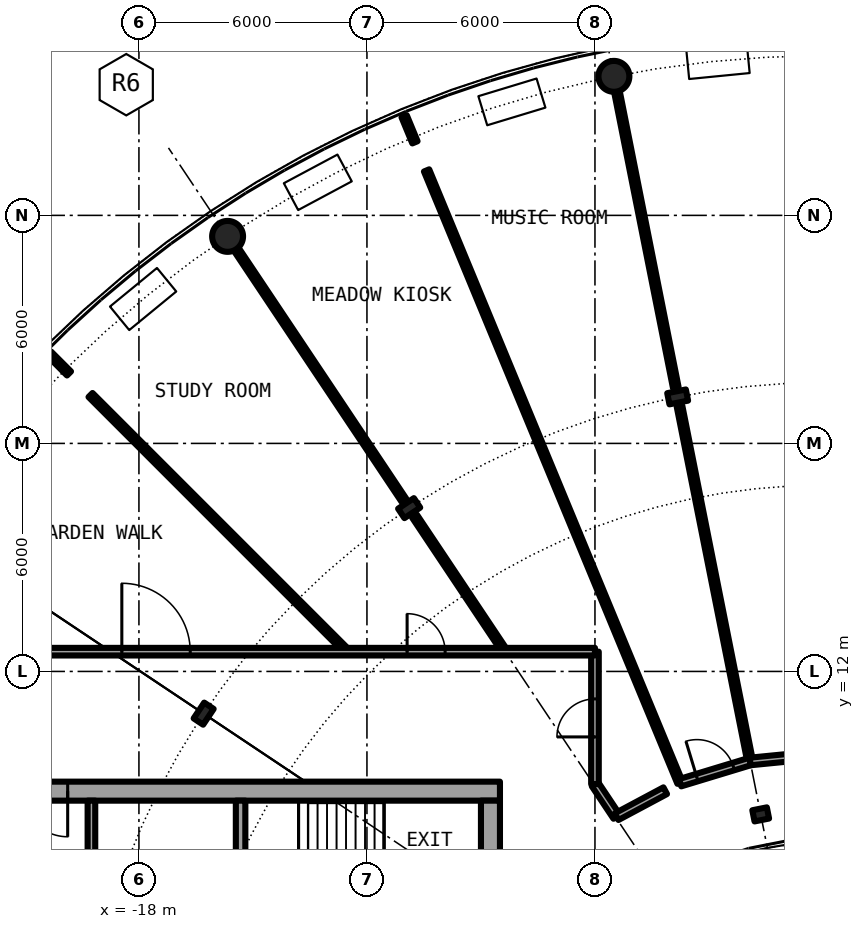
"""IFC4 building model, lengths in metres.
Left out: names, types, materials, properties, quantities, classifications, styles, units other than length and angle.
Written with IfcOpenShell. Run it as: python <this file> out.ifc"""

import sys

from ifc_helpers import new_model, si_unit, direction, frame, frame_2d, origin, origin_2d, place, context, subcontext, project, spatial, rectangle, hollow_circle, i_section, extrude, element, fill, save


model = new_model("IFC4")
c1 = context("Model", 3, precision=1e-05, world=origin(), true_north=direction((0.0, 1.0)))
c2 = subcontext(c1, "Body", "Model", "MODEL_VIEW")
j1 = project(units=[si_unit("LENGTHUNIT", "METRE"), si_unit("PLANEANGLEUNIT", "RADIAN")], contexts=[c1])
p1 = place(None, origin())
s1 = spatial("IfcSite", under=j1, at=p1, CompositionType="ELEMENT")
p2 = place(p1, origin())
s2 = spatial("IfcBuilding", under=s1, at=p2, CompositionType="ELEMENT")
p3 = place(p2, frame((0.0, 0.0, 179.9)))
s3 = spatial("IfcBuildingStorey", under=s2, at=p3, CompositionType="ELEMENT", Elevation=179.9)
for number, where, z_axis, x_axis in (
    (1, (-5.501, 27.658, 0.0), (0.0, 0.0, 1.0), (1.0, 0.0, 0.0)),
    (2, (-15.667, 23.448, 0.0), (0.0, 0.0, 1.0), (1.0, 0.0, 0.0)),
):
    element("IfcColumn", number, at=place(p3, frame(where, z_axis=z_axis, x_axis=x_axis)), inside=s3, PredefinedType="COLUMN", context=c2, shape_type="SweptSolid", body=[
        extrude(hollow_circle(Radius=0.406, WallThickness=0.04, at=origin_2d()), origin(), (0.0, 0.0, 1.0), 6.1),
    ])
for number, where, z_axis, x_axis in (
    (3, (-3.824, 19.223, 0.0), (0.0, 0.0, 1.0), (-0.195, 0.981, 0.0)),
    (4, (-10.889, 16.297, 0.0), (0.0, 0.0, 1.0), (-0.556, 0.831, 0.0)),
    (5, (-16.297, 10.889, 0.0), (0.0, 0.0, 1.0), (-0.831, 0.556, 0.0)),
):
    element("IfcColumn", number, at=place(p3, frame(where, z_axis=z_axis, x_axis=x_axis)), inside=s3, PredefinedType="COLUMN", context=c2, shape_type="SweptSolid", body=[
        extrude(i_section(OverallWidth=0.3, OverallDepth=0.5, WebThickness=0.014, FlangeThickness=0.028, FilletRadius=0.027, at=origin_2d()), origin(), (0.0, 0.0, 1.0), 6.1),
    ])
p4 = place(p3, frame((-1.639, 8.239, 0.0), z_axis=(0.0, 0.0, 1.0), x_axis=(-0.195090322016, 0.980785280403, 0.0)))
e6 = element("IfcColumn", 6, at=p4, inside=s3, PredefinedType="COLUMN", context=c2, shape_type="SweptSolid", body=[
    extrude(i_section(OverallWidth=0.3, OverallDepth=0.39, WebThickness=0.011, FlangeThickness=0.019, FilletRadius=0.027, at=origin_2d()), origin(), (0.0, 0.0, 1.0), 6.1),
])
p5 = place(p3, frame((-8.5, 8.85, 0.0), z_axis=(0.0, 0.0, 1.0), x_axis=(-1.0, 0.0, 0.0)))
e7 = element("IfcWall", 7, at=p5, inside=s3, PredefinedType="SHEAR", context=c2, shape_type="SweptSolid", body=[
    extrude(rectangle(XDim=13.6, YDim=0.5, at=frame_2d((6.8, 0.0))), origin(), (0.0, 0.0, 1.0), 6.1),
])
p6 = place(p5, frame((11.375, 0.0, 0.0)))
e8 = element("IfcOpeningElement", 8, at=p6, cuts=e7, PredefinedType="OPENING", context=c2, shape_type="SweptSolid", body=[
    extrude(rectangle(XDim=1.2, YDim=2.3, at=frame_2d((0.6, 1.15))), frame((0.0, 0.26, 0.0), z_axis=(0.0, -1.0, 0.0), x_axis=(1.0, 0.0, 0.0)), (0.0, 0.0, 1.0), 0.52),
])
p7 = place(p3, frame((-8.75, 8.6, 0.0), z_axis=(0.0, 0.0, 1.0), x_axis=(0.0, -1.0, 0.0)))
e9 = element("IfcWall", 9, at=p7, inside=s3, PredefinedType="SHEAR", context=c2, shape_type="SweptSolid", body=[
    extrude(rectangle(XDim=17.2, YDim=0.5, at=frame_2d((8.6, 0.0))), origin(), (0.0, 0.0, 1.0), 6.1),
])
p8 = place(p7, frame((7.4, 0.0, 0.1)))
e10 = element("IfcOpeningElement", 10, at=p8, cuts=e9, PredefinedType="OPENING", context=c2, shape_type="SweptSolid", body=[
    extrude(rectangle(XDim=2.4, YDim=2.2, at=frame_2d((1.2, 1.1))), frame((0.0, 0.26, 0.0), z_axis=(0.0, -1.0, 0.0), x_axis=(1.0, 0.0, 0.0)), (0.0, 0.0, 1.0), 0.52),
])
p9 = place(p3, frame((-15.325, 8.6, 0.0), z_axis=(0.0, 0.0, 1.0), x_axis=(0.0, -1.0, 0.0)))
e11 = element("IfcWall", 11, at=p9, inside=s3, PredefinedType="SHEAR", context=c2, shape_type="SweptSolid", body=[
    extrude(rectangle(XDim=3.95, YDim=0.25, at=frame_2d((1.975, 0.0))), origin(), (0.0, 0.0, 1.0), 6.1),
])
p10 = place(p9, frame((2.025, 0.0, 0.0)))
e12 = element("IfcOpeningElement", 12, at=p10, cuts=e11, PredefinedType="OPENING", context=c2, shape_type="SweptSolid", body=[
    extrude(rectangle(XDim=1.2, YDim=2.3, at=frame_2d((0.6, 1.15))), frame((0.0, 0.135, 0.0), z_axis=(0.0, -1.0, 0.0), x_axis=(1.0, 0.0, 0.0)), (0.0, 0.0, 1.0), 0.27),
])
p11 = place(p3, frame((-19.25, 8.6, 0.0), z_axis=(0.0, 0.0, 1.0), x_axis=(0.0, -1.0, 0.0)))
e13 = element("IfcWall", 13, at=p11, inside=s3, PredefinedType="SOLIDWALL", context=c2, shape_type="SweptSolid", body=[
    extrude(rectangle(XDim=7.025, YDim=0.2, at=frame_2d((3.513, 0.0))), origin(), (0.0, 0.0, 1.0), 5.7),
])
p12 = place(p11, frame((2.35, 0.0, 0.0)))
e14 = element("IfcOpeningElement", 14, at=p12, cuts=e13, PredefinedType="OPENING", context=c2, shape_type="SweptSolid", body=[
    extrude(rectangle(XDim=1.1, YDim=2.3, at=frame_2d((0.55, 1.15))), frame((0.0, 0.11, 0.0), z_axis=(0.0, -1.0, 0.0), x_axis=(1.0, 0.0, 0.0)), (0.0, 0.0, 1.0), 0.22),
])
p13 = place(p3, frame((-11.021, 26.608, 0.0), z_axis=(0.0, 0.0, 1.0), x_axis=(0.382535780864, -0.923940677943, 0.0)))
e15 = element("IfcWall", 15, at=p13, inside=s3, PredefinedType="PARTITIONING", context=c2, shape_type="SweptSolid", body=[
    extrude(rectangle(XDim=0.742, YDim=0.15, at=frame_2d((0.371, 0.0))), origin(), (0.0, 0.0, 1.0), 5.7),
])
p14 = place(p3, frame((-10.431, 25.183, 0.0), z_axis=(0.0, 0.0, 1.0), x_axis=(0.382491934833, -0.923958830137, 0.0)))
e16 = element("IfcWall", 16, at=p14, inside=s3, PredefinedType="PARTITIONING", context=c2, shape_type="SweptSolid", body=[
    extrude(rectangle(XDim=17.438, YDim=0.15, at=frame_2d((8.719, 0.0))), origin(), (0.0, 0.0, 1.0), 5.7),
])
p15 = place(p3, frame((-20.365, 20.365, 0.0), z_axis=(0.0, 0.0, 1.0), x_axis=(0.707106781187, -0.707106781187, 0.0)))
e17 = element("IfcWall", 17, at=p15, inside=s3, PredefinedType="PARTITIONING", context=c2, shape_type="SweptSolid", body=[
    extrude(rectangle(XDim=0.742, YDim=0.15, at=frame_2d((0.371, 0.0))), origin(), (0.0, 0.0, 1.0), 5.7),
])
p16 = place(p3, frame((-19.274, 19.274, 0.0), z_axis=(0.0, 0.0, 1.0), x_axis=(0.707106781187, -0.707106781187, 0.0)))
e18 = element("IfcWall", 18, at=p16, inside=s3, PredefinedType="PARTITIONING", context=c2, shape_type="SweptSolid", body=[
    extrude(rectangle(XDim=9.552, YDim=0.15, at=frame_2d((4.776, 0.0))), origin(), (0.0, 0.0, 1.0), 5.7),
])
p17 = place(p3, frame((-15.445, 23.116, 0.0), z_axis=(0.0, 0.0, 1.0), x_axis=(0.555536068825, -0.831492439073, 0.0)))
e19 = element("IfcWall", 19, at=p17, inside=s3, PredefinedType="PARTITIONING", context=c2, shape_type="SweptSolid", body=[
    extrude(rectangle(XDim=7.951, YDim=0.15, at=frame_2d((3.976, 0.0))), origin(), (0.0, 0.0, 1.0), 5.7),
])
p18 = place(p3, frame((-10.75, 16.089, 0.0), z_axis=(0.0, 0.0, 1.0), x_axis=(0.555448182904, -0.831551150627, 0.0)))
e20 = element("IfcWall", 20, at=p18, inside=s3, PredefinedType="PARTITIONING", context=c2, shape_type="SweptSolid", body=[
    extrude(rectangle(XDim=4.292, YDim=0.15, at=frame_2d((2.146, 0.0))), origin(), (0.0, 0.0, 1.0), 5.7),
])
p19 = place(p3, frame((-5.424, 27.267, 0.0), z_axis=(0.0, 0.0, 1.0), x_axis=(0.195076736895, -0.980787982554, 0.0)))
e21 = element("IfcWall", 21, at=p19, inside=s3, PredefinedType="PARTITIONING", context=c2, shape_type="SweptSolid", body=[
    extrude(rectangle(XDim=7.951, YDim=0.15, at=frame_2d((3.976, 0.0))), origin(), (0.0, 0.0, 1.0), 5.7),
])
p20 = place(p3, frame((-3.775, 18.978, 0.0), z_axis=(0.0, 0.0, 1.0), x_axis=(0.195056807593, -0.980791946241, 0.0)))
e22 = element("IfcWall", 22, at=p20, inside=s3, PredefinedType="PARTITIONING", context=c2, shape_type="SweptSolid", body=[
    extrude(rectangle(XDim=9.53, YDim=0.15, at=frame_2d((4.765, 0.0))), origin(), (0.0, 0.0, 1.0), 5.7),
])
p21 = place(p3, frame((-6.0, 9.034, 0.0), z_axis=(0.0, 0.0, 1.0), x_axis=(0.555412364489, -0.831575075007, 0.0)))
e23 = element("IfcWall", 23, at=p21, inside=s3, PredefinedType="PARTITIONING", context=c2, shape_type="SweptSolid", body=[
    extrude(rectangle(XDim=1.028, YDim=0.2, at=frame_2d((0.514, 0.0))), origin(), (0.0, 0.0, 1.0), 5.7),
])
p22 = place(p3, frame((-6.0, 9.034, 0.0), z_axis=(0.0, 0.0, 1.0), x_axis=(0.0, 1.0, 0.0)))
e24 = element("IfcWall", 24, at=p22, inside=s3, PredefinedType="PARTITIONING", context=c2, shape_type="SweptSolid", body=[
    extrude(rectangle(XDim=3.486, YDim=0.2, at=frame_2d((1.743, 0.0))), origin(), (0.0, 0.0, 1.0), 5.7),
])
p23 = place(p22, frame((1.243, 0.0, 0.0)))
e25 = element("IfcOpeningElement", 25, at=p23, cuts=e24, PredefinedType="OPENING", context=c2, shape_type="SweptSolid", body=[
    extrude(rectangle(XDim=1.0, YDim=2.3, at=frame_2d((0.5, 1.15))), frame((0.0, 0.11, 0.0), z_axis=(0.0, -1.0, 0.0), x_axis=(1.0, 0.0, 0.0)), (0.0, 0.0, 1.0), 0.22),
])
p24 = place(p3, frame((-5.429, 8.179, 0.0), z_axis=(0.0, 0.0, 1.0), x_axis=(0.88193287619, 0.471375011954, 0.0)))
e26 = element("IfcWall", 26, at=p24, inside=s3, PredefinedType="PARTITIONING", context=c2, shape_type="SweptSolid", body=[
    extrude(rectangle(XDim=1.449, YDim=0.2, at=frame_2d((0.725, 0.0))), origin(), (0.0, 0.0, 1.0), 5.7),
])
p25 = place(p3, frame((-3.758, 9.072, 0.0), z_axis=(0.0, 0.0, 1.0), x_axis=(0.956896312675, 0.29042976223, 0.0)))
e27 = element("IfcWall", 27, at=p25, inside=s3, PredefinedType="PARTITIONING", context=c2, shape_type="SweptSolid", body=[
    extrude(rectangle(XDim=1.925, YDim=0.2, at=frame_2d((0.962, 0.0))), origin(), (0.0, 0.0, 1.0), 5.7),
])
p26 = place(p25, frame((0.462, 0.0, 0.0)))
e28 = element("IfcOpeningElement", 28, at=p26, cuts=e27, PredefinedType="OPENING", context=c2, shape_type="SweptSolid", body=[
    extrude(rectangle(XDim=1.0, YDim=2.3, at=frame_2d((0.5, 1.15))), frame((0.0, 0.11, 0.0), z_axis=(0.0, -1.0, 0.0), x_axis=(1.0, 0.0, 0.0)), (0.0, 0.0, 1.0), 0.22),
])
p27 = place(p3, frame((-1.916, 9.631, 0.0), z_axis=(0.0, 0.0, 1.0), x_axis=(0.995171860647, 0.098147683504, 0.0)))
e29 = element("IfcWall", 29, at=p27, inside=s3, PredefinedType="PARTITIONING", context=c2, shape_type="SweptSolid", body=[
    extrude(rectangle(XDim=1.925, YDim=0.2, at=frame_2d((0.963, 0.0))), origin(), (0.0, 0.0, 1.0), 5.7),
])
p28 = place(p3, frame((-21.9, 12.52, 0.0), z_axis=(0.0, 0.0, 1.0), x_axis=(1.0, 0.0, 0.0)))
e30 = element("IfcWall", 30, at=p28, inside=s3, PredefinedType="PARTITIONING", context=c2, shape_type="SweptSolid", body=[
    extrude(rectangle(XDim=15.9, YDim=0.2, at=frame_2d((7.95, 0.0))), origin(), (0.0, 0.0, 1.0), 5.7),
])
p29 = place(p28, frame((10.957, 0.0, 0.0)))
e31 = element("IfcOpeningElement", 31, at=p29, cuts=e30, PredefinedType="OPENING", context=c2, shape_type="SweptSolid", body=[
    extrude(rectangle(XDim=1.0, YDim=2.3, at=frame_2d((0.5, 1.15))), frame((0.0, 0.11, 0.0), z_axis=(0.0, -1.0, 0.0), x_axis=(1.0, 0.0, 0.0)), (0.0, 0.0, 1.0), 0.22),
])
p30 = place(p28, frame((3.45, 0.0, 0.0)))
e32 = element("IfcOpeningElement", 32, at=p30, cuts=e30, PredefinedType="OPENING", context=c2, shape_type="SweptSolid", body=[
    extrude(rectangle(XDim=1.8, YDim=2.3, at=frame_2d((0.9, 1.15))), frame((0.0, 0.11, 0.0), z_axis=(0.0, -1.0, 0.0), x_axis=(1.0, 0.0, 0.0)), (0.0, 0.0, 1.0), 0.22),
])
p31 = place(p6, origin())
e33 = element("IfcDoor", 33, at=p31, inside=s3, OperationType="SINGLE_SWING_LEFT", PredefinedType="DOOR", context=c2, shape_type="SweptSolid", body=[
    extrude(rectangle(XDim=1.2, YDim=2.3, at=frame_2d((0.6, 1.15))), frame((0.0, 0.025, 0.0), z_axis=(0.0, -1.0, 0.0), x_axis=(1.0, 0.0, 0.0)), (0.0, 0.0, 1.0), 0.05),
])
fill(e8, e33)
p32 = place(p26, origin())
e34 = element("IfcDoor", 34, at=p32, inside=s3, OperationType="SINGLE_SWING_RIGHT", PredefinedType="DOOR", context=c2, shape_type="SweptSolid", body=[
    extrude(rectangle(XDim=1.0, YDim=2.3, at=frame_2d((0.5, 1.15))), frame((0.0, 0.025, 0.0), z_axis=(0.0, -1.0, 0.0), x_axis=(1.0, 0.0, 0.0)), (0.0, 0.0, 1.0), 0.05),
])
fill(e28, e34)
p33 = place(p23, origin())
e35 = element("IfcDoor", 35, at=p33, inside=s3, OperationType="SINGLE_SWING_RIGHT", PredefinedType="DOOR", context=c2, shape_type="SweptSolid", body=[
    extrude(rectangle(XDim=1.0, YDim=2.3, at=frame_2d((0.5, 1.15))), frame((0.0, 0.025, 0.0), z_axis=(0.0, -1.0, 0.0), x_axis=(1.0, 0.0, 0.0)), (0.0, 0.0, 1.0), 0.05),
])
fill(e25, e35)
p34 = place(p29, origin())
e36 = element("IfcDoor", 36, at=p34, inside=s3, OperationType="SINGLE_SWING_RIGHT", PredefinedType="DOOR", context=c2, shape_type="SweptSolid", body=[
    extrude(rectangle(XDim=1.0, YDim=2.3, at=frame_2d((0.5, 1.15))), frame((0.0, 0.025, 0.0), z_axis=(0.0, -1.0, 0.0), x_axis=(1.0, 0.0, 0.0)), (0.0, 0.0, 1.0), 0.05),
])
fill(e31, e36)
p35 = place(p30, origin())
e37 = element("IfcDoor", 37, at=p35, inside=s3, OperationType="DOUBLE_DOOR_SINGLE_SWING", PredefinedType="DOOR", context=c2, shape_type="SweptSolid", body=[
    extrude(rectangle(XDim=1.8, YDim=2.3, at=frame_2d((0.9, 1.15))), frame((0.0, 0.025, 0.0), z_axis=(0.0, -1.0, 0.0), x_axis=(1.0, 0.0, 0.0)), (0.0, 0.0, 1.0), 0.05),
])
fill(e32, e37)
save(model, sys.argv[1])
